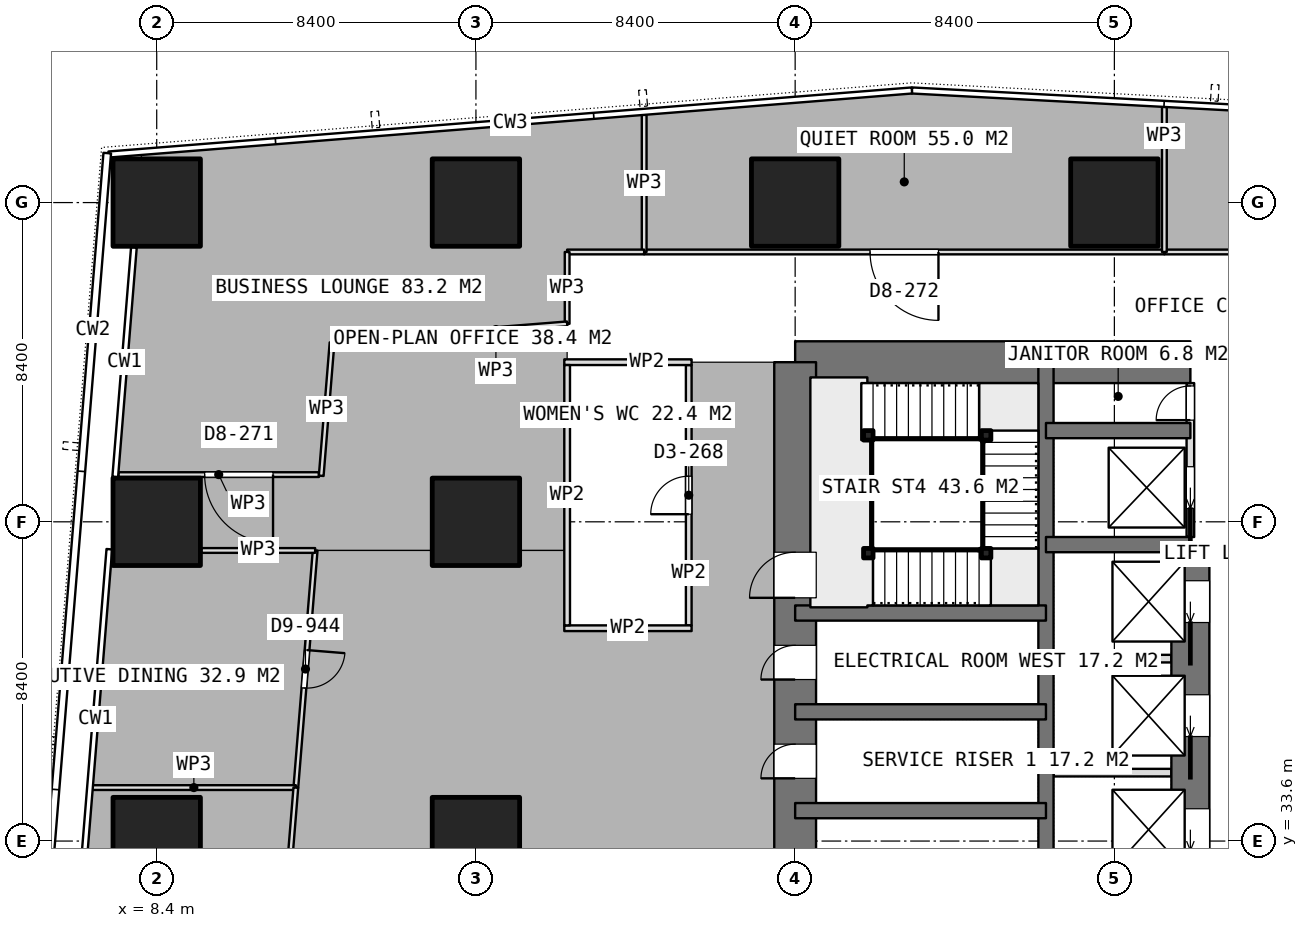
"""IFC4 building model, lengths in metres.
Left out: names, types, materials, properties, quantities, classifications, styles, units other than length and angle.
Written with IfcOpenShell. Run it as: python <this file> out.ifc"""

import sys

from ifc_helpers import new_model, si_unit, direction, frame, frame_2d, origin, origin_2d, place, context, subcontext, project, spatial, rectangle, extrude, element, fill, save


model = new_model("IFC4")
c1 = context("Model", 3, precision=1e-05, world=origin(), true_north=direction((0.0, 1.0)))
c2 = subcontext(c1, "Body", "Model", "MODEL_VIEW")
j1 = project(units=[si_unit("LENGTHUNIT", "METRE"), si_unit("PLANEANGLEUNIT", "RADIAN")], contexts=[c1])
p1 = place(None, origin())
s1 = spatial("IfcSite", under=j1, at=p1, CompositionType="ELEMENT")
p2 = place(p1, origin())
s2 = spatial("IfcBuilding", under=s1, at=p2, CompositionType="ELEMENT")
p3 = place(p2, frame((0.0, 0.0, 250.1)))
s3 = spatial("IfcBuildingStorey", under=s2, at=p3, CompositionType="ELEMENT", Elevation=250.1)
p4 = place(p3, frame((25.2, 46.2, 0.0), z_axis=(0.0, 0.0, 1.0), x_axis=(1.0, 0.0, 0.0)))
e1 = element("IfcWall", 1, at=p4, inside=s3, PredefinedType="SHEAR", context=c2, shape_type="SweptSolid", body=[
    extrude(rectangle(XDim=10.4, YDim=1.1, at=frame_2d((5.2, 0.0))), origin(), (0.0, 0.0, 1.0), 3.75),
])
p5 = place(p3, frame((25.2, 21.0, 0.0), z_axis=(0.0, 0.0, 1.0), x_axis=(0.0, 1.0, 0.0)))
e2 = element("IfcWall", 2, at=p5, inside=s3, PredefinedType="SHEAR", context=c2, shape_type="SweptSolid", body=[
    extrude(rectangle(XDim=25.2, YDim=1.1, at=frame_2d((12.6, 0.0))), origin(), (0.0, 0.0, 1.0), 3.75),
])
p6 = place(p5, frame((7.8, 0.0, 0.0)))
e3 = element("IfcOpeningElement", 3, at=p6, cuts=e2, PredefinedType="OPENING", context=c2, shape_type="SweptSolid", body=[
    extrude(rectangle(XDim=1.2, YDim=2.1, at=frame_2d((0.6, 1.05))), frame((0.0, 0.56, 0.0), z_axis=(0.0, -1.0, 0.0), x_axis=(1.0, 0.0, 0.0)), (0.0, 0.0, 1.0), 1.12),
])
p7 = place(p5, frame((14.25, 0.0, 0.0)))
e4 = element("IfcOpeningElement", 4, at=p7, cuts=e2, PredefinedType="OPENING", context=c2, shape_type="SweptSolid", body=[
    extrude(rectangle(XDim=0.9, YDim=2.1, at=frame_2d((0.45, 1.05))), frame((0.0, 0.56, 0.0), z_axis=(0.0, -1.0, 0.0), x_axis=(1.0, 0.0, 0.0)), (0.0, 0.0, 1.0), 1.12),
])
p8 = place(p5, frame((16.85, 0.0, 0.0)))
e5 = element("IfcOpeningElement", 5, at=p8, cuts=e2, PredefinedType="OPENING", context=c2, shape_type="SweptSolid", body=[
    extrude(rectangle(XDim=0.9, YDim=2.1, at=frame_2d((0.45, 1.05))), frame((0.0, 0.56, 0.0), z_axis=(0.0, -1.0, 0.0), x_axis=(1.0, 0.0, 0.0)), (0.0, 0.0, 1.0), 1.12),
])
p9 = place(p5, frame((19.0, 0.0, 0.0)))
e6 = element("IfcOpeningElement", 6, at=p9, cuts=e2, PredefinedType="OPENING", context=c2, shape_type="SweptSolid", body=[
    extrude(rectangle(XDim=1.2, YDim=2.1, at=frame_2d((0.6, 1.05))), frame((0.0, 0.56, 0.0), z_axis=(0.0, -1.0, 0.0), x_axis=(1.0, 0.0, 0.0)), (0.0, 0.0, 1.0), 1.12),
])
p10 = place(p3, frame((31.8, 21.0, 0.0), z_axis=(0.0, 0.0, 1.0), x_axis=(0.0, 1.0, 0.0)))
e7 = element("IfcWall", 7, at=p10, inside=s3, PredefinedType="SHEAR", context=c2, shape_type="SweptSolid", body=[
    extrude(rectangle(XDim=25.2, YDim=0.4, at=frame_2d((12.6, 0.0))), origin(), (0.0, 0.0, 1.0), 3.75),
])
p11 = place(p3, frame((35.6, 23.4, 0.0), z_axis=(0.0, 0.0, 1.0), x_axis=(0.0, 1.0, 0.0)))
e8 = element("IfcWall", 8, at=p11, inside=s3, PredefinedType="SHEAR", context=c2, shape_type="SweptSolid", body=[
    extrude(rectangle(XDim=18.0, YDim=1.0, at=frame_2d((9.0, 0.0))), origin(), (0.0, 0.0, 1.0), 3.75),
])
p12 = place(p11, frame((0.95, 0.0, 0.0)))
e9 = element("IfcOpeningElement", 9, at=p12, cuts=e8, PredefinedType="OPENING", context=c2, shape_type="SweptSolid", body=[
    extrude(rectangle(XDim=1.1, YDim=2.1, at=frame_2d((0.55, 1.05))), frame((0.0, 0.51, 0.0), z_axis=(0.0, -1.0, 0.0), x_axis=(1.0, 0.0, 0.0)), (0.0, 0.0, 1.0), 1.02),
])
p13 = place(p11, frame((3.95, 0.0, 0.0)))
e10 = element("IfcOpeningElement", 10, at=p13, cuts=e8, PredefinedType="OPENING", context=c2, shape_type="SweptSolid", body=[
    extrude(rectangle(XDim=1.1, YDim=2.1, at=frame_2d((0.55, 1.05))), frame((0.0, 0.51, 0.0), z_axis=(0.0, -1.0, 0.0), x_axis=(1.0, 0.0, 0.0)), (0.0, 0.0, 1.0), 1.02),
])
p14 = place(p11, frame((6.95, 0.0, 0.0)))
e11 = element("IfcOpeningElement", 11, at=p14, cuts=e8, PredefinedType="OPENING", context=c2, shape_type="SweptSolid", body=[
    extrude(rectangle(XDim=1.1, YDim=2.1, at=frame_2d((0.55, 1.05))), frame((0.0, 0.51, 0.0), z_axis=(0.0, -1.0, 0.0), x_axis=(1.0, 0.0, 0.0)), (0.0, 0.0, 1.0), 1.02),
])
p15 = place(p11, frame((9.95, 0.0, 0.0)))
e12 = element("IfcOpeningElement", 12, at=p15, cuts=e8, PredefinedType="OPENING", context=c2, shape_type="SweptSolid", body=[
    extrude(rectangle(XDim=1.1, YDim=2.1, at=frame_2d((0.55, 1.05))), frame((0.0, 0.51, 0.0), z_axis=(0.0, -1.0, 0.0), x_axis=(1.0, 0.0, 0.0)), (0.0, 0.0, 1.0), 1.02),
])
p16 = place(p11, frame((12.95, 0.0, 0.0)))
e13 = element("IfcOpeningElement", 13, at=p16, cuts=e8, PredefinedType="OPENING", context=c2, shape_type="SweptSolid", body=[
    extrude(rectangle(XDim=1.1, YDim=2.1, at=frame_2d((0.55, 1.05))), frame((0.0, 0.51, 0.0), z_axis=(0.0, -1.0, 0.0), x_axis=(1.0, 0.0, 0.0)), (0.0, 0.0, 1.0), 1.02),
])
p17 = place(p11, frame((15.95, 0.0, 0.0)))
e14 = element("IfcOpeningElement", 14, at=p17, cuts=e8, PredefinedType="OPENING", context=c2, shape_type="SweptSolid", body=[
    extrude(rectangle(XDim=1.1, YDim=2.1, at=frame_2d((0.55, 1.05))), frame((0.0, 0.51, 0.0), z_axis=(0.0, -1.0, 0.0), x_axis=(1.0, 0.0, 0.0)), (0.0, 0.0, 1.0), 1.02),
])
for number, where, z_axis, x_axis in (
    (15, (31.8, 41.4, 0.0), (0.0, 0.0, 1.0), (1.0, 0.0, 0.0)),
    (16, (31.8, 44.4, 0.0), (0.0, 0.0, 1.0), (1.0, 0.0, 0.0)),
):
    element("IfcWall", number, at=place(p3, frame(where, z_axis=z_axis, x_axis=x_axis)), inside=s3, PredefinedType="SHEAR", context=c2, shape_type="SweptSolid", body=[
        extrude(rectangle(XDim=3.8, YDim=0.4, at=frame_2d((1.9, 0.0))), origin(), (0.0, 0.0, 1.0), 3.75),
    ])
for number, where, z_axis, x_axis in (
    (17, (25.2, 34.4, 0.0), (0.0, 0.0, 1.0), (1.0, 0.0, 0.0)),
    (18, (25.2, 37.0, 0.0), (0.0, 0.0, 1.0), (1.0, 0.0, 0.0)),
    (19, (25.2, 39.6, 0.0), (0.0, 0.0, 1.0), (1.0, 0.0, 0.0)),
):
    element("IfcWall", number, at=place(p3, frame(where, z_axis=z_axis, x_axis=x_axis)), inside=s3, PredefinedType="SHEAR", context=c2, shape_type="SweptSolid", body=[
        extrude(rectangle(XDim=6.6, YDim=0.4, at=frame_2d((3.3, 0.0))), origin(), (0.0, 0.0, 1.0), 3.75),
    ])
for number, where, z_axis, x_axis in (
    (20, (8.4, 33.6, 0.0), (0.0, 0.0, 1.0), (1.0, 0.0, 0.0)),
    (21, (8.4, 42.0, 0.0), (0.0, 0.0, 1.0), (1.0, 0.0, 0.0)),
    (22, (8.4, 50.4, 0.0), (0.0, 0.0, 1.0), (1.0, 0.0, 0.0)),
    (23, (16.8, 33.6, 0.0), (0.0, 0.0, 1.0), (1.0, 0.0, 0.0)),
    (24, (16.8, 42.0, 0.0), (0.0, 0.0, 1.0), (1.0, 0.0, 0.0)),
    (25, (16.8, 50.4, 0.0), (0.0, 0.0, 1.0), (1.0, 0.0, 0.0)),
    (26, (25.2, 50.4, 0.0), (0.0, 0.0, 1.0), (1.0, 0.0, 0.0)),
    (27, (33.6, 50.4, 0.0), (0.0, 0.0, 1.0), (1.0, 0.0, 0.0)),
):
    element("IfcColumn", number, at=place(p3, frame(where, z_axis=z_axis, x_axis=x_axis)), inside=s3, PredefinedType="COLUMN", context=c2, shape_type="SweptSolid", body=[
        extrude(rectangle(XDim=2.3, YDim=2.3, at=origin_2d()), origin(), (0.0, 0.0, 1.0), 3.75),
    ])
for number, where, z_axis, x_axis in (
    (28, (32.0, 35.4, 0.0), (0.0, 0.0, 1.0), (1.0, 0.0, 0.0)),
    (29, (32.0, 38.4, 0.0), (0.0, 0.0, 1.0), (1.0, 0.0, 0.0)),
):
    element("IfcWall", number, at=place(p3, frame(where, z_axis=z_axis, x_axis=x_axis)), inside=s3, PredefinedType="PARTITIONING", context=c2, shape_type="SweptSolid", body=[
        extrude(rectangle(XDim=3.1, YDim=0.2, at=frame_2d((1.55, 0.0))), origin(), (0.0, 0.0, 1.0), 3.5),
    ])
p18 = place(p3, frame((35.6, 41.6, 0.0), z_axis=(0.0, 0.0, 1.0), x_axis=(0.0, 1.0, 0.0)))
e30 = element("IfcWall", 30, at=p18, inside=s3, PredefinedType="PARTITIONING", context=c2, shape_type="SweptSolid", body=[
    extrude(rectangle(XDim=4.05, YDim=0.2, at=frame_2d((2.025, 0.0))), origin(), (0.0, 0.0, 1.0), 3.5),
])
p19 = place(p18, frame((3.075, 0.0, 0.0)))
e31 = element("IfcOpeningElement", 31, at=p19, cuts=e30, PredefinedType="OPENING", context=c2, shape_type="SweptSolid", body=[
    extrude(rectangle(XDim=0.9, YDim=2.1, at=frame_2d((0.45, 1.05))), frame((0.0, 0.11, 0.0), z_axis=(0.0, -1.0, 0.0), x_axis=(1.0, 0.0, 0.0)), (0.0, 0.0, 1.0), 0.22),
])
p20 = place(p18, frame((0.75, 0.0, 0.0)))
e32 = element("IfcOpeningElement", 32, at=p20, cuts=e30, PredefinedType="OPENING", context=c2, shape_type="SweptSolid", body=[
    extrude(rectangle(XDim=1.1, YDim=2.1, at=frame_2d((0.55, 1.05))), frame((0.0, 0.11, 0.0), z_axis=(0.0, -1.0, 0.0), x_axis=(1.0, 0.0, 0.0)), (0.0, 0.0, 1.0), 0.22),
])
for number, where, z_axis, x_axis in (
    (33, (19.125, 39.2, 0.0), (0.0, 0.0, 1.0), (1.0, 0.0, 0.0)),
    (34, (19.125, 46.2, 0.0), (0.0, 0.0, 1.0), (1.0, 0.0, 0.0)),
):
    element("IfcWall", number, at=place(p3, frame(where, z_axis=z_axis, x_axis=x_axis)), inside=s3, PredefinedType="PARTITIONING", context=c2, shape_type="SweptSolid", body=[
        extrude(rectangle(XDim=3.35, YDim=0.15, at=frame_2d((1.675, 0.0))), origin(), (0.0, 0.0, 1.0), 3.5),
    ])
p21 = place(p3, frame((19.2, 39.275, 0.0), z_axis=(0.0, 0.0, 1.0), x_axis=(0.0, 1.0, 0.0)))
e35 = element("IfcWall", 35, at=p21, inside=s3, PredefinedType="PARTITIONING", context=c2, shape_type="SweptSolid", body=[
    extrude(rectangle(XDim=6.85, YDim=0.15, at=frame_2d((3.425, 0.0))), origin(), (0.0, 0.0, 1.0), 3.5),
])
p22 = place(p3, frame((22.4, 39.275, 0.0), z_axis=(0.0, 0.0, 1.0), x_axis=(0.0, 1.0, 0.0)))
e36 = element("IfcWall", 36, at=p22, inside=s3, PredefinedType="PARTITIONING", context=c2, shape_type="SweptSolid", body=[
    extrude(rectangle(XDim=6.85, YDim=0.15, at=frame_2d((3.425, 0.0))), origin(), (0.0, 0.0, 1.0), 3.5),
])
p23 = place(p22, frame((2.925, 0.0, 0.0)))
e37 = element("IfcOpeningElement", 37, at=p23, cuts=e36, PredefinedType="OPENING", context=c2, shape_type="SweptSolid", body=[
    extrude(rectangle(XDim=1.0, YDim=2.1, at=frame_2d((0.5, 1.05))), frame((0.0, 0.085, 0.0), z_axis=(0.0, -1.0, 0.0), x_axis=(1.0, 0.0, 0.0)), (0.0, 0.0, 1.0), 0.17),
])
p24 = place(p3, frame((51.681, 49.1, 0.0), z_axis=(0.0, 0.0, 1.0), x_axis=(-1.0, 0.0, 0.0)))
e38 = element("IfcWall", 38, at=p24, inside=s3, PredefinedType="PARTITIONING", context=c2, shape_type="SweptSolid", body=[
    extrude(rectangle(XDim=16.765, YDim=0.125, at=frame_2d((8.382, 0.0))), origin(), (0.0, 0.0, 1.0), 3.5),
])
p25 = place(p24, frame((6.583, 0.0, 0.0)))
e39 = element("IfcOpeningElement", 39, at=p25, cuts=e38, PredefinedType="OPENING", context=c2, shape_type="SweptSolid", body=[
    extrude(rectangle(XDim=1.8, YDim=2.1, at=frame_2d((0.9, 1.05))), frame((0.0, 0.073, 0.0), z_axis=(0.0, -1.0, 0.0), x_axis=(1.0, 0.0, 0.0)), (0.0, 0.0, 1.0), 0.145),
])
p26 = place(p3, frame((34.916, 49.1, 0.0), z_axis=(0.0, 0.0, 1.0), x_axis=(0.0, 1.0, 0.0)))
e40 = element("IfcWall", 40, at=p26, inside=s3, PredefinedType="PARTITIONING", context=c2, shape_type="SweptSolid", body=[
    extrude(rectangle(XDim=3.817, YDim=0.125, at=frame_2d((1.908, 0.0))), origin(), (0.0, 0.0, 1.0), 3.5),
])
p27 = place(p3, frame((34.915, 49.1, 0.0), z_axis=(0.0, 0.0, 1.0), x_axis=(-1.0, 0.0, 0.0)))
e41 = element("IfcWall", 41, at=p27, inside=s3, PredefinedType="PARTITIONING", context=c2, shape_type="SweptSolid", body=[
    extrude(rectangle(XDim=13.688, YDim=0.125, at=frame_2d((6.844, 0.0))), origin(), (0.0, 0.0, 1.0), 3.5),
])
p28 = place(p27, frame((5.944, 0.0, 0.0)))
e42 = element("IfcOpeningElement", 42, at=p28, cuts=e41, PredefinedType="OPENING", context=c2, shape_type="SweptSolid", body=[
    extrude(rectangle(XDim=1.8, YDim=2.1, at=frame_2d((0.9, 1.05))), frame((0.0, 0.073, 0.0), z_axis=(0.0, -1.0, 0.0), x_axis=(1.0, 0.0, 0.0)), (0.0, 0.0, 1.0), 0.145),
])
p29 = place(p3, frame((21.227, 49.1, 0.0), z_axis=(0.0, 0.0, 1.0), x_axis=(0.0, 1.0, 0.0)))
e43 = element("IfcWall", 43, at=p29, inside=s3, PredefinedType="PARTITIONING", context=c2, shape_type="SweptSolid", body=[
    extrude(rectangle(XDim=3.608, YDim=0.125, at=frame_2d((1.804, 0.0))), origin(), (0.0, 0.0, 1.0), 3.5),
])
p30 = place(p3, frame((12.669, 43.242, 0.0), z_axis=(0.0, 0.0, 1.0), x_axis=(-1.0, 0.0, 0.0)))
e44 = element("IfcWall", 44, at=p30, inside=s3, PredefinedType="PARTITIONING", context=c2, shape_type="SweptSolid", body=[
    extrude(rectangle(XDim=5.275, YDim=0.125, at=frame_2d((2.637, 0.0))), origin(), (0.0, 0.0, 1.0), 3.5),
])
p31 = place(p30, frame((1.208, 0.0, 0.0)))
e45 = element("IfcOpeningElement", 45, at=p31, cuts=e44, PredefinedType="OPENING", context=c2, shape_type="SweptSolid", body=[
    extrude(rectangle(XDim=1.8, YDim=2.1, at=frame_2d((0.9, 1.05))), frame((0.0, 0.073, 0.0), z_axis=(0.0, -1.0, 0.0), x_axis=(1.0, 0.0, 0.0)), (0.0, 0.0, 1.0), 0.145),
])
p32 = place(p3, frame((21.226, 49.1, 0.0), z_axis=(0.0, 0.0, 1.0), x_axis=(-1.0, 0.0, 0.0)))
e46 = element("IfcWall", 46, at=p32, inside=s3, PredefinedType="PARTITIONING", context=c2, shape_type="SweptSolid", body=[
    extrude(rectangle(XDim=2.026, YDim=0.125, at=frame_2d((1.013, 0.0))), origin(), (0.0, 0.0, 1.0), 3.5),
])
p33 = place(p3, frame((19.2, 49.1, 0.0), z_axis=(0.0, 0.0, 1.0), x_axis=(0.0, -1.0, 0.0)))
e47 = element("IfcWall", 47, at=p33, inside=s3, PredefinedType="PARTITIONING", context=c2, shape_type="SweptSolid", body=[
    extrude(rectangle(XDim=1.891, YDim=0.125, at=frame_2d((0.946, 0.0))), origin(), (0.0, 0.0, 1.0), 3.5),
])
p34 = place(p3, frame((19.2, 47.209, 0.0), z_axis=(0.0, 0.0, 1.0), x_axis=(-0.996831568036, -0.079541341248, 0.0)))
e48 = element("IfcWall", 48, at=p34, inside=s3, PredefinedType="PARTITIONING", context=c2, shape_type="SweptSolid", body=[
    extrude(rectangle(XDim=3.76, YDim=0.125, at=frame_2d((1.88, 0.0))), origin(), (0.0, 0.0, 1.0), 3.5),
])
p35 = place(p3, frame((15.452, 46.91, 0.0), z_axis=(0.0, 0.0, 1.0), x_axis=(-0.996853884913, -0.079261164092, 0.0)))
e49 = element("IfcWall", 49, at=p35, inside=s3, PredefinedType="PARTITIONING", context=c2, shape_type="SweptSolid", body=[
    extrude(rectangle(XDim=2.446, YDim=0.125, at=frame_2d((1.223, 0.0))), origin(), (0.0, 0.0, 1.0), 3.5),
])
p36 = place(p3, frame((13.014, 46.716, 0.0), z_axis=(0.0, 0.0, 1.0), x_axis=(-0.081017185094, -0.996712704705, 0.0)))
e50 = element("IfcWall", 50, at=p36, inside=s3, PredefinedType="PARTITIONING", context=c2, shape_type="SweptSolid", body=[
    extrude(rectangle(XDim=3.517, YDim=0.125, at=frame_2d((1.758, 0.0))), origin(), (0.0, 0.0, 1.0), 3.5),
])
p37 = place(p3, frame((12.569, 41.246, 0.0), z_axis=(0.0, 0.0, 1.0), x_axis=(-0.081163543691, -0.996700797218, 0.0)))
e51 = element("IfcWall", 51, at=p37, inside=s3, PredefinedType="PARTITIONING", context=c2, shape_type="SweptSolid", body=[
    extrude(rectangle(XDim=6.26, YDim=0.125, at=frame_2d((3.13, 0.0))), origin(), (0.0, 0.0, 1.0), 3.5),
])
p38 = place(p37, frame((2.63, 0.0, 0.0)))
e52 = element("IfcOpeningElement", 52, at=p38, cuts=e51, PredefinedType="OPENING", context=c2, shape_type="SweptSolid", body=[
    extrude(rectangle(XDim=1.0, YDim=2.1, at=frame_2d((0.5, 1.05))), frame((0.0, 0.073, 0.0), z_axis=(0.0, -1.0, 0.0), x_axis=(1.0, 0.0, 0.0)), (0.0, 0.0, 1.0), 0.145),
])
p39 = place(p3, frame((12.061, 35.007, 0.0), z_axis=(0.0, 0.0, 1.0), x_axis=(-1.0, 0.0, 0.0)))
e53 = element("IfcWall", 53, at=p39, inside=s3, PredefinedType="PARTITIONING", context=c2, shape_type="SweptSolid", body=[
    extrude(rectangle(XDim=5.367, YDim=0.125, at=frame_2d((2.684, 0.0))), origin(), (0.0, 0.0, 1.0), 3.5),
])
p40 = place(p3, frame((9.57, 41.246, 0.0), z_axis=(0.0, 0.0, 1.0), x_axis=(1.0, 0.0, 0.0)))
e54 = element("IfcWall", 54, at=p40, inside=s3, PredefinedType="PARTITIONING", context=c2, shape_type="SweptSolid", body=[
    extrude(rectangle(XDim=2.999, YDim=0.125, at=frame_2d((1.5, 0.0))), origin(), (0.0, 0.0, 1.0), 3.5),
])
p41 = place(p3, frame((12.061, 35.006, 0.0), z_axis=(0.0, 0.0, 1.0), x_axis=(-0.081085632838, -0.996707138606, 0.0)))
e55 = element("IfcWall", 55, at=p41, inside=s3, PredefinedType="PARTITIONING", context=c2, shape_type="SweptSolid", body=[
    extrude(rectangle(XDim=6.537, YDim=0.125, at=frame_2d((3.268, 0.0))), origin(), (0.0, 0.0, 1.0), 3.5),
])
for number, where, z_axis, x_axis in (
    (56, (27.125, 41.175, 0.0), (0.0, 0.0, 1.0), (1.0, 0.0, 0.0)),
    (57, (30.225, 41.175, 0.0), (0.0, 0.0, 1.0), (1.0, 0.0, 0.0)),
    (58, (30.225, 44.275, 0.0), (0.0, 0.0, 1.0), (1.0, 0.0, 0.0)),
    (59, (27.125, 44.275, 0.0), (0.0, 0.0, 1.0), (1.0, 0.0, 0.0)),
):
    element("IfcColumn", number, at=place(p3, frame(where, z_axis=z_axis, x_axis=x_axis)), inside=s3, PredefinedType="COLUMN", context=c2, shape_type="SweptSolid", body=[
        extrude(rectangle(XDim=0.25, YDim=0.25, at=origin_2d()), origin(), (0.0, 0.0, 1.0), 3.75),
    ])
p42 = place(p7, origin())
e60 = element("IfcDoor", 60, at=p42, inside=s3, OperationType="SINGLE_SWING_LEFT", PredefinedType="DOOR", context=c2, shape_type="SweptSolid", body=[
    extrude(rectangle(XDim=0.9, YDim=2.1, at=frame_2d((0.45, 1.05))), frame((0.0, 0.025, 0.0), z_axis=(0.0, -1.0, 0.0), x_axis=(1.0, 0.0, 0.0)), (0.0, 0.0, 1.0), 0.05),
])
fill(e4, e60)
p43 = place(p8, origin())
e61 = element("IfcDoor", 61, at=p43, inside=s3, OperationType="SINGLE_SWING_LEFT", PredefinedType="DOOR", context=c2, shape_type="SweptSolid", body=[
    extrude(rectangle(XDim=0.9, YDim=2.1, at=frame_2d((0.45, 1.05))), frame((0.0, 0.025, 0.0), z_axis=(0.0, -1.0, 0.0), x_axis=(1.0, 0.0, 0.0)), (0.0, 0.0, 1.0), 0.05),
])
fill(e5, e61)
p44 = place(p19, origin())
e62 = element("IfcDoor", 62, at=p44, inside=s3, OperationType="SINGLE_SWING_LEFT", PredefinedType="DOOR", context=c2, shape_type="SweptSolid", body=[
    extrude(rectangle(XDim=0.9, YDim=2.1, at=frame_2d((0.45, 1.05))), frame((0.0, 0.025, 0.0), z_axis=(0.0, -1.0, 0.0), x_axis=(1.0, 0.0, 0.0)), (0.0, 0.0, 1.0), 0.05),
])
fill(e31, e62)
p45 = place(p15, origin())
e63 = element("IfcDoor", 63, at=p45, inside=s3, OperationType="SLIDING_TO_LEFT", PredefinedType="USERDEFINED", context=c2, shape_type="SweptSolid", body=[
    extrude(rectangle(XDim=1.1, YDim=2.1, at=frame_2d((0.55, 1.05))), frame((0.0, 0.025, 0.0), z_axis=(0.0, -1.0, 0.0), x_axis=(1.0, 0.0, 0.0)), (0.0, 0.0, 1.0), 0.05),
])
fill(e12, e63)
p46 = place(p16, origin())
e64 = element("IfcDoor", 64, at=p46, inside=s3, OperationType="SLIDING_TO_LEFT", PredefinedType="USERDEFINED", context=c2, shape_type="SweptSolid", body=[
    extrude(rectangle(XDim=1.1, YDim=2.1, at=frame_2d((0.55, 1.05))), frame((0.0, 0.025, 0.0), z_axis=(0.0, -1.0, 0.0), x_axis=(1.0, 0.0, 0.0)), (0.0, 0.0, 1.0), 0.05),
])
fill(e13, e64)
p47 = place(p17, origin())
e65 = element("IfcDoor", 65, at=p47, inside=s3, OperationType="SLIDING_TO_LEFT", PredefinedType="USERDEFINED", context=c2, shape_type="SweptSolid", body=[
    extrude(rectangle(XDim=1.1, YDim=2.1, at=frame_2d((0.55, 1.05))), frame((0.0, 0.025, 0.0), z_axis=(0.0, -1.0, 0.0), x_axis=(1.0, 0.0, 0.0)), (0.0, 0.0, 1.0), 0.05),
])
fill(e14, e65)
p48 = place(p20, origin())
e66 = element("IfcDoor", 66, at=p48, inside=s3, OperationType="SLIDING_TO_LEFT", PredefinedType="USERDEFINED", context=c2, shape_type="SweptSolid", body=[
    extrude(rectangle(XDim=1.1, YDim=2.1, at=frame_2d((0.55, 1.05))), frame((0.0, 0.025, 0.0), z_axis=(0.0, -1.0, 0.0), x_axis=(1.0, 0.0, 0.0)), (0.0, 0.0, 1.0), 0.05),
])
fill(e32, e66)
p49 = place(p23, origin())
e67 = element("IfcDoor", 67, at=p49, inside=s3, OperationType="SINGLE_SWING_LEFT", PredefinedType="DOOR", context=c2, shape_type="SweptSolid", body=[
    extrude(rectangle(XDim=1.0, YDim=2.1, at=frame_2d((0.5, 1.05))), frame((0.0, 0.025, 0.0), z_axis=(0.0, -1.0, 0.0), x_axis=(1.0, 0.0, 0.0)), (0.0, 0.0, 1.0), 0.05),
])
fill(e37, e67)
p50 = place(p28, origin())
e68 = element("IfcDoor", 68, at=p50, inside=s3, OperationType="DOUBLE_DOOR_SINGLE_SWING", PredefinedType="DOOR", context=c2, shape_type="SweptSolid", body=[
    extrude(rectangle(XDim=1.8, YDim=2.1, at=frame_2d((0.9, 1.05))), frame((0.0, 0.025, 0.0), z_axis=(0.0, -1.0, 0.0), x_axis=(1.0, 0.0, 0.0)), (0.0, 0.0, 1.0), 0.05),
])
fill(e42, e68)
p51 = place(p31, origin())
e69 = element("IfcDoor", 69, at=p51, inside=s3, OperationType="DOUBLE_DOOR_SINGLE_SWING", PredefinedType="DOOR", context=c2, shape_type="SweptSolid", body=[
    extrude(rectangle(XDim=1.8, YDim=2.1, at=frame_2d((0.9, 1.05))), frame((0.0, 0.025, 0.0), z_axis=(0.0, -1.0, 0.0), x_axis=(1.0, 0.0, 0.0)), (0.0, 0.0, 1.0), 0.05),
])
fill(e45, e69)
p52 = place(p38, origin())
e70 = element("IfcDoor", 70, at=p52, inside=s3, OperationType="SINGLE_SWING_LEFT", PredefinedType="DOOR", context=c2, shape_type="SweptSolid", body=[
    extrude(rectangle(XDim=1.0, YDim=2.1, at=frame_2d((0.5, 1.05))), frame((0.0, 0.025, 0.0), z_axis=(0.0, -1.0, 0.0), x_axis=(1.0, 0.0, 0.0)), (0.0, 0.0, 1.0), 0.05),
])
fill(e52, e70)
p53 = place(p9, origin())
e71 = element("IfcDoor", 71, at=p53, inside=s3, OperationType="SINGLE_SWING_RIGHT", PredefinedType="DOOR", context=c2, shape_type="SweptSolid", body=[
    extrude(rectangle(XDim=1.2, YDim=2.1, at=frame_2d((0.6, 1.05))), frame((0.0, 0.025, 0.0), z_axis=(0.0, -1.0, 0.0), x_axis=(1.0, 0.0, 0.0)), (0.0, 0.0, 1.0), 0.05),
])
fill(e6, e71)
save(model, sys.argv[1])
